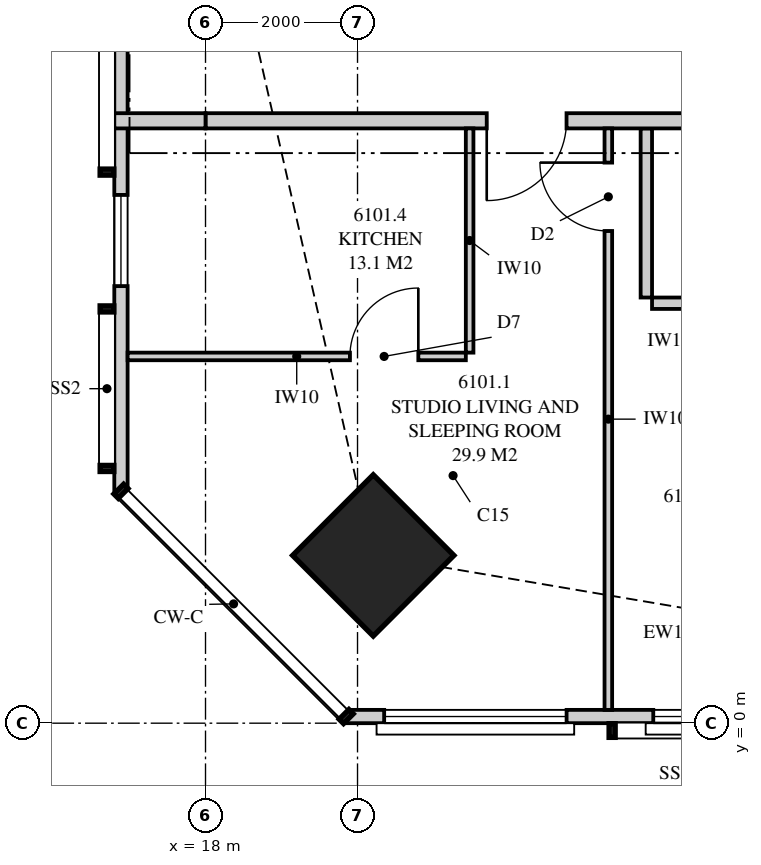
"""IFC4 building model, lengths in metres.
Left out: names, types, materials, properties, quantities, classifications, styles, units other than length and angle.
Written with IfcOpenShell. Run it as: python <this file> out.ifc"""

import sys

from ifc_helpers import new_model, si_unit, direction, frame, frame_2d, origin, origin_2d, place, context, subcontext, project, spatial, polyline, rectangle, outline, extrude, element, fill, save


model = new_model("IFC4")
c1 = context("Model", 3, precision=1e-05, world=origin(), true_north=direction((0.0, 1.0)))
c2 = subcontext(c1, "Body", "Model", "MODEL_VIEW")
j1 = project(units=[si_unit("LENGTHUNIT", "METRE"), si_unit("PLANEANGLEUNIT", "RADIAN")], contexts=[c1])
p1 = place(None, origin())
s1 = spatial("IfcSite", under=j1, at=p1, CompositionType="ELEMENT")
p2 = place(p1, origin())
s2 = spatial("IfcBuilding", under=s1, at=p2, CompositionType="ELEMENT")
p3 = place(p2, frame((0.0, 0.0, 224.95)))
s3 = spatial("IfcBuildingStorey", under=s2, at=p3, CompositionType="ELEMENT", Elevation=224.95)
p4 = place(p3, frame((20.207, 2.207, 0.0), z_axis=(0.0, 0.0, 1.0), x_axis=(0.707106781187, 0.707106781187, 0.0)))
e1 = element("IfcColumn", 1, at=p4, inside=s3, PredefinedType="COLUMN", context=c2, shape_type="SweptSolid", body=[
    extrude(rectangle(XDim=1.5, YDim=1.5, at=origin_2d()), origin(), (0.0, 0.0, 1.0), 3.5),
])
p5 = place(p3, frame((19.851, 0.087, 0.0), z_axis=(0.0, 0.0, 1.0), x_axis=(1.0, 0.0, 0.0)))
e2 = element("IfcWall", 2, at=p5, inside=s3, PredefinedType="SOLIDWALL", context=c2, shape_type="SweptSolid", body=[
    extrude(outline(polyline([(0.0, 0.0), (12.449, 0.0), (12.449, 2.3), (7.774, 2.3), (7.774, 3.26), (7.642, 3.26), (7.642, 2.3), (7.559, 2.3), (7.559, 3.26), (0.0, 3.26), (0.0, 0.0)])), frame((0.0, 0.087, 0.0), z_axis=(0.0, -1.0, 0.0), x_axis=(1.0, 0.0, 0.0)), (0.0, 0.0, 1.0), 0.175),
])
p6 = place(p5, frame((0.5, 0.0, 0.4)))
e3 = element("IfcOpeningElement", 3, at=p6, cuts=e2, PredefinedType="OPENING", context=c2, shape_type="SweptSolid", body=[
    extrude(rectangle(XDim=2.4, YDim=1.85, at=frame_2d((1.2, 0.925))), frame((0.0, 0.097, 0.0), z_axis=(0.0, -1.0, 0.0), x_axis=(1.0, 0.0, 0.0)), (0.0, 0.0, 1.0), 0.195),
])
p7 = place(p5, frame((4.04, 0.0, 0.4)))
e4 = element("IfcOpeningElement", 4, at=p7, cuts=e2, PredefinedType="OPENING", context=c2, shape_type="SweptSolid", body=[
    extrude(rectangle(XDim=1.8, YDim=1.85, at=frame_2d((0.9, 0.925))), frame((0.0, 0.097, 0.0), z_axis=(0.0, -1.0, 0.0), x_axis=(1.0, 0.0, 0.0)), (0.0, 0.0, 1.0), 0.195),
])
p8 = place(p5, frame((9.699, 0.0, 0.4)))
e5 = element("IfcOpeningElement", 5, at=p8, cuts=e2, PredefinedType="OPENING", context=c2, shape_type="SweptSolid", body=[
    extrude(rectangle(XDim=2.4, YDim=1.85, at=frame_2d((1.2, 0.925))), frame((0.0, 0.097, 0.0), z_axis=(0.0, -1.0, 0.0), x_axis=(1.0, 0.0, 0.0)), (0.0, 0.0, 1.0), 0.195),
])
p9 = place(p3, frame((16.887, 30.949, 0.0), z_axis=(0.0, 0.0, 1.0), x_axis=(0.0, -1.0, 0.0)))
e6 = element("IfcWall", 6, at=p9, inside=s3, PredefinedType="SOLIDWALL", context=c2, shape_type="SweptSolid", body=[
    extrude(outline(polyline([(0.0, 0.0), (27.897, 0.0), (27.897, 3.26), (18.148, 3.26), (18.148, 2.3), (18.125, 2.3), (18.125, 3.26), (17.949, 3.26), (17.949, 2.3), (5.949, 2.3), (5.949, 3.26), (0.0, 3.26), (0.0, 0.0)])), frame((0.0, 0.087, 0.0), z_axis=(0.0, -1.0, 0.0), x_axis=(1.0, 0.0, 0.0)), (0.0, 0.0, 1.0), 0.175),
])
p10 = place(p9, frame((11.849, 0.0, 0.4)))
e7 = element("IfcOpeningElement", 7, at=p10, cuts=e6, PredefinedType="OPENING", context=c2, shape_type="SweptSolid", body=[
    extrude(rectangle(XDim=1.2, YDim=1.85, at=frame_2d((0.6, 0.925))), frame((0.0, 0.097, 0.0), z_axis=(0.0, -1.0, 0.0), x_axis=(1.0, 0.0, 0.0)), (0.0, 0.0, 1.0), 0.195),
])
p11 = place(p9, frame((23.999, 0.0, 0.4)))
e8 = element("IfcOpeningElement", 8, at=p11, cuts=e6, PredefinedType="OPENING", context=c2, shape_type="SweptSolid", body=[
    extrude(rectangle(XDim=1.2, YDim=1.85, at=frame_2d((0.6, 0.925))), frame((0.0, 0.097, 0.0), z_axis=(0.0, -1.0, 0.0), x_axis=(1.0, 0.0, 0.0)), (0.0, 0.0, 1.0), 0.195),
])
p12 = place(p3, frame((18.0, 7.925, 0.0), z_axis=(0.0, 0.0, 1.0), x_axis=(1.0, 0.0, 0.0)))
e9 = element("IfcWall", 9, at=p12, inside=s3, PredefinedType="PARTITIONING", context=c2, shape_type="SweptSolid", body=[
    extrude(outline(polyline([(0.0, 0.0), (8.3, 0.0), (8.3, 3.26), (1.839, 3.26), (1.839, 2.3), (0.0, 2.3), (0.0, 3.26), (0.0, 0.0)])), frame((0.0, 0.1, 0.0), z_axis=(0.0, -1.0, 0.0), x_axis=(1.0, 0.0, 0.0)), (0.0, 0.0, 1.0), 0.2),
])
p13 = place(p12, frame((3.7, 0.0, 0.0)))
e10 = element("IfcOpeningElement", 10, at=p13, cuts=e9, PredefinedType="OPENING", context=c2, shape_type="SweptSolid", body=[
    extrude(rectangle(XDim=1.05, YDim=2.2, at=frame_2d((0.525, 1.1))), frame((0.0, 0.11, 0.0), z_axis=(0.0, -1.0, 0.0), x_axis=(1.0, 0.0, 0.0)), (0.0, 0.0, 1.0), 0.22),
])
p14 = place(p3, frame((23.875, 5.525, 0.0), z_axis=(0.0, 0.0, 1.0), x_axis=(1.0, 0.0, 0.0)))
e11 = element("IfcWall", 11, at=p14, inside=s3, PredefinedType="PLUMBINGWALL", context=c2, shape_type="SweptSolid", body=[
    extrude(rectangle(XDim=2.425, YDim=0.15, at=frame_2d((1.212, 0.0))), origin(), (0.0, 0.0, 1.0), 3.26),
])
p15 = place(p14, frame((0.775, 0.0, 0.0)))
e12 = element("IfcOpeningElement", 12, at=p15, cuts=e11, PredefinedType="OPENING", context=c2, shape_type="SweptSolid", body=[
    extrude(rectangle(XDim=0.9, YDim=2.1, at=frame_2d((0.45, 1.05))), frame((0.0, 0.085, 0.0), z_axis=(0.0, -1.0, 0.0), x_axis=(1.0, 0.0, 0.0)), (0.0, 0.0, 1.0), 0.17),
])
p16 = place(p3, frame((23.8, 5.6, 0.0), z_axis=(0.0, 0.0, 1.0), x_axis=(0.0, 1.0, 0.0)))
e13 = element("IfcWall", 13, at=p16, inside=s3, PredefinedType="PLUMBINGWALL", context=c2, shape_type="SweptSolid", body=[
    extrude(rectangle(XDim=2.225, YDim=0.15, at=frame_2d((1.112, 0.0))), origin(), (0.0, 0.0, 1.0), 3.26),
])
p17 = place(p3, frame((23.3, 0.175, 0.0), z_axis=(0.0, 0.0, 1.0), x_axis=(0.0, 1.0, 0.0)))
e14 = element("IfcWall", 14, at=p17, inside=s3, PredefinedType="PARTITIONING", context=c2, shape_type="SweptSolid", body=[
    extrude(outline(polyline([(0.0, 0.0), (7.65, 0.0), (7.65, 3.26), (2.38, 3.26), (2.38, 2.3), (0.636, 2.3), (0.636, 3.26), (0.0, 3.26), (0.0, 0.0)])), frame((0.0, 0.05, 0.0), z_axis=(0.0, -1.0, 0.0), x_axis=(1.0, 0.0, 0.0)), (0.0, 0.0, 1.0), 0.1),
])
p18 = place(p17, frame((6.3, 0.0, 0.0)))
e15 = element("IfcOpeningElement", 15, at=p18, cuts=e14, PredefinedType="OPENING", context=c2, shape_type="SweptSolid", body=[
    extrude(rectangle(XDim=0.9, YDim=2.1, at=frame_2d((0.45, 1.05))), frame((0.0, 0.06, 0.0), z_axis=(0.0, -1.0, 0.0), x_axis=(1.0, 0.0, 0.0)), (0.0, 0.0, 1.0), 0.12),
])
p19 = place(p3, frame((16.975, 4.825, 0.0), z_axis=(0.0, 0.0, 1.0), x_axis=(1.0, 0.0, 0.0)))
e16 = element("IfcWall", 16, at=p19, inside=s3, PredefinedType="PARTITIONING", context=c2, shape_type="SweptSolid", body=[
    extrude(outline(polyline([(0.0, 0.0), (4.45, 0.0), (4.45, 3.26), (3.518, 3.26), (3.518, 2.3), (1.754, 2.3), (1.754, 3.26), (0.0, 3.26), (0.0, 0.0)])), frame((0.0, 0.05, 0.0), z_axis=(0.0, -1.0, 0.0), x_axis=(1.0, 0.0, 0.0)), (0.0, 0.0, 1.0), 0.1),
])
p20 = place(p19, frame((2.925, 0.0, 0.0)))
e17 = element("IfcOpeningElement", 17, at=p20, cuts=e16, PredefinedType="OPENING", context=c2, shape_type="SweptSolid", body=[
    extrude(rectangle(XDim=0.9, YDim=2.1, at=frame_2d((0.45, 1.05))), frame((0.0, 0.06, 0.0), z_axis=(0.0, -1.0, 0.0), x_axis=(1.0, 0.0, 0.0)), (0.0, 0.0, 1.0), 0.12),
])
p21 = place(p3, frame((21.475, 4.875, 0.0), z_axis=(0.0, 0.0, 1.0), x_axis=(0.0, 1.0, 0.0)))
e18 = element("IfcWall", 18, at=p21, inside=s3, PredefinedType="PARTITIONING", context=c2, shape_type="SweptSolid", body=[
    extrude(rectangle(XDim=2.95, YDim=0.1, at=frame_2d((1.475, 0.0))), origin(), (0.0, 0.0, 1.0), 3.26),
])
p22 = place(p3, frame((16.8, 7.925, 0.0), z_axis=(0.0, 0.0, 1.0), x_axis=(1.0, 0.0, 0.0)))
e19 = element("IfcWall", 19, at=p22, inside=s3, PredefinedType="PARTITIONING", context=c2, shape_type="SweptSolid", body=[
    extrude(outline(polyline([(0.0, 0.0), (1.2, 0.0), (1.2, 3.26), (1.2, 2.3), (1.172, 2.3), (1.172, 3.26), (0.0, 3.26), (0.0, 0.0)])), frame((0.0, 0.1, 0.0), z_axis=(0.0, -1.0, 0.0), x_axis=(1.0, 0.0, 0.0)), (0.0, 0.0, 1.0), 0.2),
])
p23 = place(p6, origin())
e20 = element("IfcWindow", 20, at=p23, inside=s3, PartitioningType="SINGLE_PANEL", PredefinedType="WINDOW", context=c2, shape_type="SweptSolid", body=[
    extrude(rectangle(XDim=2.4, YDim=1.85, at=frame_2d((1.2, 0.925))), frame((0.0, 0.03, 0.0), z_axis=(0.0, -1.0, 0.0), x_axis=(1.0, 0.0, 0.0)), (0.0, 0.0, 1.0), 0.06),
])
fill(e3, e20)
p24 = place(p7, origin())
e21 = element("IfcWindow", 21, at=p24, inside=s3, PartitioningType="SINGLE_PANEL", PredefinedType="WINDOW", context=c2, shape_type="SweptSolid", body=[
    extrude(rectangle(XDim=1.8, YDim=1.85, at=frame_2d((0.9, 0.925))), frame((0.0, 0.03, 0.0), z_axis=(0.0, -1.0, 0.0), x_axis=(1.0, 0.0, 0.0)), (0.0, 0.0, 1.0), 0.06),
])
fill(e4, e21)
p25 = place(p11, origin())
e22 = element("IfcWindow", 22, at=p25, inside=s3, PartitioningType="SINGLE_PANEL", PredefinedType="WINDOW", context=c2, shape_type="SweptSolid", body=[
    extrude(rectangle(XDim=1.2, YDim=1.85, at=frame_2d((0.6, 0.925))), frame((0.0, 0.03, 0.0), z_axis=(0.0, -1.0, 0.0), x_axis=(1.0, 0.0, 0.0)), (0.0, 0.0, 1.0), 0.06),
])
fill(e8, e22)
p26 = place(p13, frame((1.05, 0.0, 0.0), z_axis=(0.0, 0.0, 1.0), x_axis=(-1.0, 0.0, 0.0)))
e23 = element("IfcDoor", 23, at=p26, inside=s3, OperationType="SINGLE_SWING_RIGHT", PredefinedType="DOOR", context=c2, shape_type="SweptSolid", body=[
    extrude(rectangle(XDim=1.05, YDim=2.2, at=frame_2d((0.525, 1.1))), frame((0.0, 0.025, 0.0), z_axis=(0.0, -1.0, 0.0), x_axis=(1.0, 0.0, 0.0)), (0.0, 0.0, 1.0), 0.05),
])
fill(e10, e23)
p27 = place(p18, origin())
e24 = element("IfcDoor", 24, at=p27, inside=s3, OperationType="SINGLE_SWING_RIGHT", PredefinedType="DOOR", context=c2, shape_type="SweptSolid", body=[
    extrude(rectangle(XDim=0.9, YDim=2.1, at=frame_2d((0.45, 1.05))), frame((0.0, 0.025, 0.0), z_axis=(0.0, -1.0, 0.0), x_axis=(1.0, 0.0, 0.0)), (0.0, 0.0, 1.0), 0.05),
])
fill(e15, e24)
p28 = place(p20, origin())
e25 = element("IfcDoor", 25, at=p28, inside=s3, OperationType="SINGLE_SWING_RIGHT", PredefinedType="DOOR", context=c2, shape_type="SweptSolid", body=[
    extrude(rectangle(XDim=0.9, YDim=2.1, at=frame_2d((0.45, 1.05))), frame((0.0, 0.025, 0.0), z_axis=(0.0, -1.0, 0.0), x_axis=(1.0, 0.0, 0.0)), (0.0, 0.0, 1.0), 0.05),
])
fill(e17, e25)
save(model, sys.argv[1])
